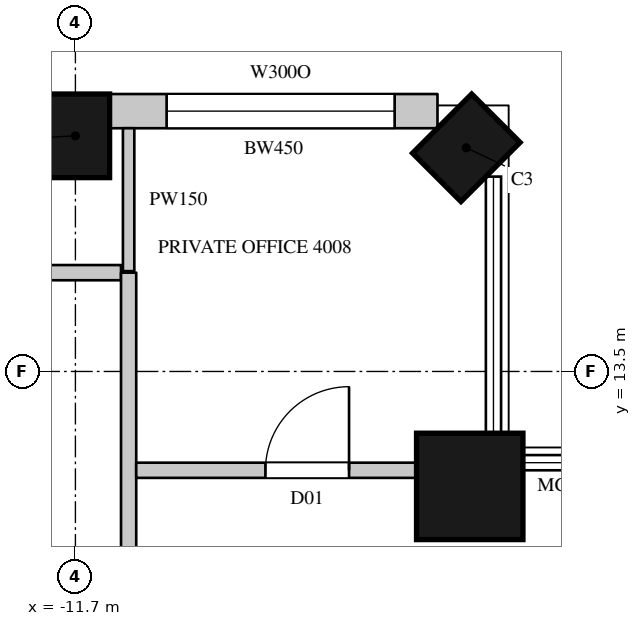
"""IFC4 building model, lengths in metres.
Left out: names, types, materials, properties, quantities, classifications, styles, units other than length and angle.
Written with IfcOpenShell. Run it as: python <this file> out.ifc"""

import sys

from ifc_helpers import new_model, si_unit, direction, frame, frame_2d, origin, origin_2d, place, context, subcontext, project, spatial, rectangle, circle, extrude, element, fill, save


model = new_model("IFC4")
c1 = context("Model", 3, precision=1e-05, world=origin(), true_north=direction((0.0, 1.0)))
c2 = subcontext(c1, "Body", "Model", "MODEL_VIEW")
j1 = project(units=[si_unit("LENGTHUNIT", "METRE"), si_unit("PLANEANGLEUNIT", "RADIAN")], contexts=[c1])
p1 = place(None, origin())
s1 = spatial("IfcSite", under=j1, at=p1, CompositionType="ELEMENT")
p2 = place(p1, origin())
s2 = spatial("IfcBuilding", under=s1, at=p2, CompositionType="ELEMENT")
p3 = place(p2, frame((0.0, 0.0, 185.1)))
s3 = spatial("IfcBuildingStorey", under=s2, at=p3, CompositionType="ELEMENT", Elevation=185.1)
p4 = place(p3, frame((-6.512, 11.988, 0.0), z_axis=(0.0, 0.0, 1.0), x_axis=(1.0, 0.0, 0.0)))
e1 = element("IfcColumn", 1, at=p4, inside=s3, PredefinedType="COLUMN", context=c2, shape_type="SweptSolid", body=[
    extrude(circle(Radius=0.7, at=origin_2d()), origin(), (0.0, 0.0, 1.0), 4.1),
])
for number, where, z_axis, x_axis in (
    (2, (-6.557, 16.443, 0.0), (0.0, 0.0, 1.0), (-0.707, 0.707, 0.0)),
    (3, (-11.7, 16.6, 0.0), (0.0, 0.0, 1.0), (-1.0, 0.0, 0.0)),
):
    element("IfcColumn", number, at=place(p3, frame(where, z_axis=z_axis, x_axis=x_axis)), inside=s3, PredefinedType="COLUMN", context=c2, shape_type="SweptSolid", body=[
        extrude(rectangle(XDim=0.9, YDim=1.1, at=origin_2d()), origin(), (0.0, 0.0, 1.0), 4.1),
    ])
p5 = place(p3, frame((-6.936, 16.925, 0.0), z_axis=(0.0, 0.0, 1.0), x_axis=(-1.0, 0.0, 0.0)))
e4 = element("IfcWall", 4, at=p5, inside=s3, PredefinedType="SOLIDWALL", context=c2, shape_type="SweptSolid", body=[
    extrude(rectangle(XDim=4.314, YDim=0.45, at=frame_2d((2.157, 0.0))), origin(), (0.0, 0.0, 1.0), 3.8),
])
p6 = place(p5, frame((0.564, 0.0, 1.05)))
e5 = element("IfcOpeningElement", 5, at=p6, cuts=e4, PredefinedType="OPENING", context=c2, shape_type="SweptSolid", body=[
    extrude(rectangle(XDim=3.0, YDim=2.4, at=frame_2d((1.5, 1.2))), frame((0.0, 0.235, 0.0), z_axis=(0.0, -1.0, 0.0), x_axis=(1.0, 0.0, 0.0)), (0.0, 0.0, 1.0), 0.47),
])
p7 = place(p3, frame((-13.97, 14.8, 0.0), z_axis=(0.0, 0.0, 1.0), x_axis=(1.0, 0.0, 0.0)))
e6 = element("IfcWall", 6, at=p7, inside=s3, PredefinedType="PARTITIONING", context=c2, shape_type="SweptSolid", body=[
    extrude(rectangle(XDim=2.87, YDim=0.2, at=frame_2d((1.435, 0.0))), origin(), (0.0, 0.0, 1.0), 3.8),
])
p8 = place(p3, frame((-11.0, -14.8, 0.0), z_axis=(0.0, 0.0, 1.0), x_axis=(0.0, 1.0, 0.0)))
e7 = element("IfcWall", 7, at=p8, inside=s3, PredefinedType="PARTITIONING", context=c2, shape_type="SweptSolid", body=[
    extrude(rectangle(XDim=29.6, YDim=0.2, at=frame_2d((14.8, 0.0))), origin(), (0.0, 0.0, 1.0), 3.8),
])
p9 = place(p8, frame((20.15, 0.0, 0.0)))
e8 = element("IfcOpeningElement", 8, at=p9, cuts=e7, PredefinedType="OPENING", context=c2, shape_type="SweptSolid", body=[
    extrude(rectangle(XDim=1.5, YDim=2.4, at=frame_2d((0.75, 1.2))), frame((0.0, 0.11, 0.0), z_axis=(0.0, -1.0, 0.0), x_axis=(1.0, 0.0, 0.0)), (0.0, 0.0, 1.0), 0.22),
])
p10 = place(p3, frame((-10.9, 12.2, 0.0), z_axis=(0.0, 0.0, 1.0), x_axis=(1.0, 0.0, 0.0)))
e9 = element("IfcWall", 9, at=p10, inside=s3, PredefinedType="PARTITIONING", context=c2, shape_type="SweptSolid", body=[
    extrude(rectangle(XDim=3.704, YDim=0.2, at=frame_2d((1.852, 0.0))), origin(), (0.0, 0.0, 1.0), 3.8),
])
p11 = place(p10, frame((1.7, 0.0, 0.0)))
e10 = element("IfcOpeningElement", 10, at=p11, cuts=e9, PredefinedType="OPENING", context=c2, shape_type="SweptSolid", body=[
    extrude(rectangle(XDim=1.1, YDim=2.4, at=frame_2d((0.55, 1.2))), frame((0.0, 0.11, 0.0), z_axis=(0.0, -1.0, 0.0), x_axis=(1.0, 0.0, 0.0)), (0.0, 0.0, 1.0), 0.22),
])
p12 = place(p3, frame((-11.0, 14.82, 0.0), z_axis=(0.0, 0.0, 1.0), x_axis=(0.0, 1.0, 0.0)))
e11 = element("IfcWall", 11, at=p12, inside=s3, PredefinedType="PARTITIONING", context=c2, shape_type="SweptSolid", body=[
    extrude(rectangle(XDim=1.88, YDim=0.15, at=frame_2d((0.94, 0.0))), origin(), (0.0, 0.0, 1.0), 3.8),
])
p13 = place(p6, origin())
e12 = element("IfcWindow", 12, at=p13, inside=s3, PartitioningType="SINGLE_PANEL", PredefinedType="WINDOW", context=c2, shape_type="SweptSolid", body=[
    extrude(rectangle(XDim=3.0, YDim=2.4, at=frame_2d((1.5, 1.2))), frame((0.0, 0.135, 0.0), z_axis=(0.0, -1.0, 0.0), x_axis=(1.0, 0.0, 0.0)), (0.0, 0.0, 1.0), 0.06),
])
fill(e5, e12)
p14 = place(p11, origin())
e13 = element("IfcDoor", 13, at=p14, inside=s3, OperationType="SINGLE_SWING_RIGHT", PredefinedType="DOOR", context=c2, shape_type="SweptSolid", body=[
    extrude(rectangle(XDim=1.1, YDim=2.4, at=frame_2d((0.55, 1.2))), frame((0.0, 0.025, 0.0), z_axis=(0.0, -1.0, 0.0), x_axis=(1.0, 0.0, 0.0)), (0.0, 0.0, 1.0), 0.05),
])
fill(e10, e13)
save(model, sys.argv[1])
